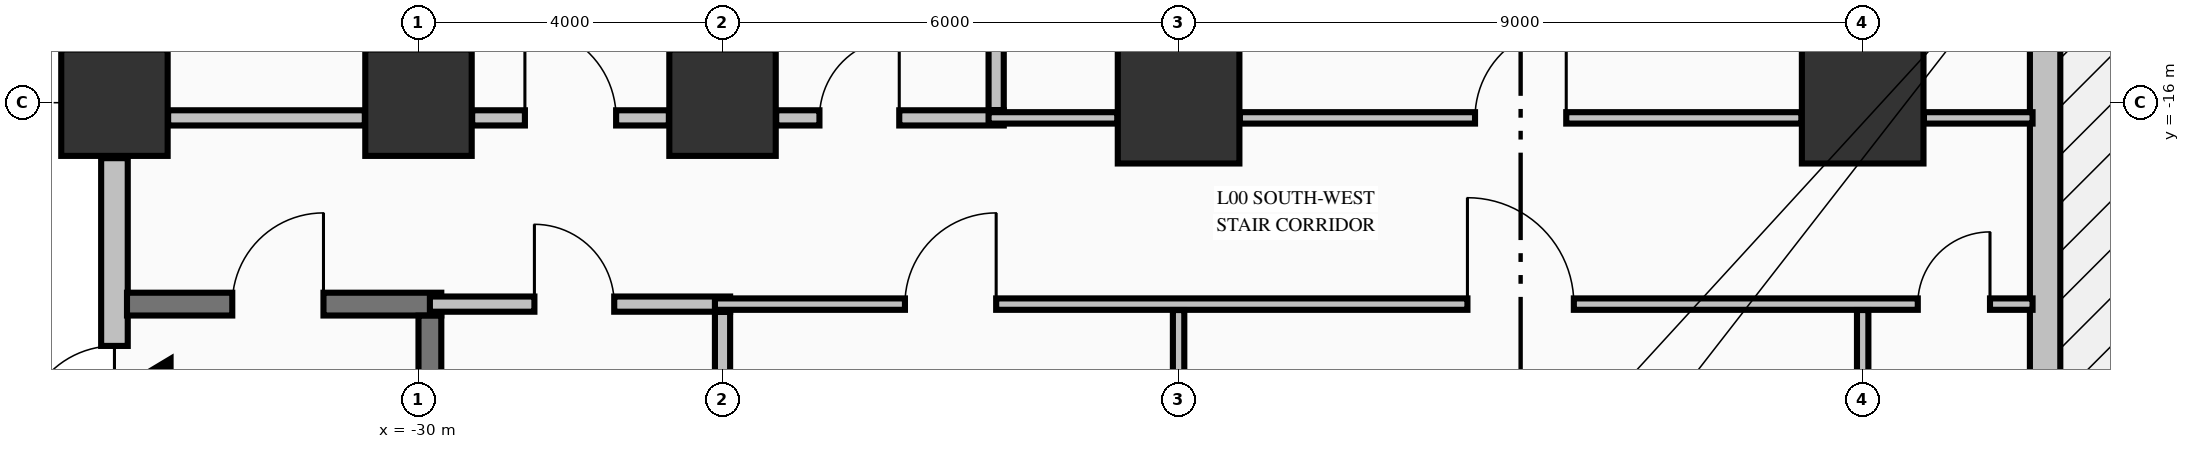
"""IFC4 building model, lengths in metres.
Left out: names, types, materials, properties, quantities, classifications, styles, units other than length and angle.
Written with IfcOpenShell. Run it as: python <this file> out.ifc"""

import sys

from ifc_helpers import new_model, si_unit, direction, frame, frame_2d, origin, origin_2d, place, context, subcontext, project, spatial, rectangle, extrude, element, fill, save


model = new_model("IFC4")
c1 = context("Model", 3, precision=1e-05, world=origin(), true_north=direction((0.0, 1.0)))
c2 = subcontext(c1, "Body", "Model", "MODEL_VIEW")
j1 = project(units=[si_unit("LENGTHUNIT", "METRE"), si_unit("PLANEANGLEUNIT", "RADIAN")], contexts=[c1])
p1 = place(None, origin())
s1 = spatial("IfcSite", under=j1, at=p1, CompositionType="ELEMENT")
p2 = place(p1, origin())
s2 = spatial("IfcBuilding", under=s1, at=p2, CompositionType="ELEMENT")
p3 = place(p2, origin())
s3 = spatial("IfcBuildingStorey", under=s2, at=p3, CompositionType="ELEMENT", Elevation=0.0)
for number, where, z_axis, x_axis in (
    (1, (-34.0, -16.0, 0.0), (0.0, 0.0, 1.0), (1.0, 0.0, 0.0)),
    (2, (-30.0, -16.0, 0.0), (0.0, 0.0, 1.0), (1.0, 0.0, 0.0)),
    (3, (-26.0, -16.0, 0.0), (0.0, 0.0, 1.0), (1.0, 0.0, 0.0)),
):
    element("IfcColumn", number, at=place(p3, frame(where, z_axis=z_axis, x_axis=x_axis)), inside=s3, PredefinedType="COLUMN", context=c2, shape_type="SweptSolid", body=[
        extrude(rectangle(XDim=1.4, YDim=1.4, at=origin_2d()), origin(), (0.0, 0.0, 1.0), 5.09),
    ])
for number, where, z_axis, x_axis in (
    (4, (-20.0, -16.0, 0.0), (0.0, 0.0, 1.0), (1.0, 0.0, 0.0)),
    (5, (-11.0, -16.0, 0.0), (0.0, 0.0, 1.0), (1.0, 0.0, 0.0)),
):
    element("IfcColumn", number, at=place(p3, frame(where, z_axis=z_axis, x_axis=x_axis)), inside=s3, PredefinedType="COLUMN", context=c2, shape_type="SweptSolid", body=[
        extrude(rectangle(XDim=1.6, YDim=1.6, at=origin_2d()), origin(), (0.0, 0.0, 1.0), 5.09),
    ])
p4 = place(p3, frame((-34.0, -21.27, 0.0), z_axis=(0.0, 0.0, 1.0), x_axis=(0.0, 1.0, 0.0)))
e6 = element("IfcWall", 6, at=p4, inside=s3, PredefinedType="STANDARD", context=c2, shape_type="SweptSolid", body=[
    extrude(rectangle(XDim=4.54, YDim=0.35, at=frame_2d((2.27, 0.0))), origin(), (0.0, 0.0, 1.0), 5.09),
])
p5 = place(p4, frame((0.87, 0.0, 0.0)))
e7 = element("IfcOpeningElement", 7, at=p5, cuts=e6, PredefinedType="OPENING", context=c2, shape_type="SweptSolid", body=[
    extrude(rectangle(XDim=1.2, YDim=2.2, at=frame_2d((0.6, 1.1))), frame((0.0, 0.185, 0.0), z_axis=(0.0, -1.0, 0.0), x_axis=(1.0, 0.0, 0.0)), (0.0, 0.0, 1.0), 0.37),
])
p6 = place(p3, frame((-8.6, -25.35, 0.0), z_axis=(0.0, 0.0, 1.0), x_axis=(0.0, 1.0, 0.0)))
e8 = element("IfcWall", 8, at=p6, inside=s3, PredefinedType="STANDARD", context=c2, shape_type="SweptSolid", body=[
    extrude(rectangle(XDim=24.7, YDim=0.4, at=frame_2d((12.35, 0.0))), origin(), (0.0, 0.0, 1.0), 4.132),
])
p7 = place(p6, frame((10.5, 0.0, 0.0)))
e9 = element("IfcOpeningElement", 9, at=p7, cuts=e8, PredefinedType="OPENING", context=c2, shape_type="SweptSolid", body=[
    extrude(rectangle(XDim=2.4, YDim=2.6, at=frame_2d((1.2, 1.3))), frame((0.0, 0.21, 0.0), z_axis=(0.0, -1.0, 0.0), x_axis=(1.0, 0.0, 0.0)), (0.0, 0.0, 1.0), 0.42),
])
p8 = place(p3, frame((-33.835, -18.65, 0.0), z_axis=(0.0, 0.0, 1.0), x_axis=(1.0, 0.0, 0.0)))
e10 = element("IfcWall", 10, at=p8, inside=s3, PredefinedType="SHEAR", context=c2, shape_type="SweptSolid", body=[
    extrude(rectangle(XDim=4.135, YDim=0.3, at=frame_2d((2.067, 0.0))), origin(), (0.0, 0.0, 1.0), 5.09),
])
p9 = place(p8, frame((1.385, 0.0, 0.0)))
e11 = element("IfcOpeningElement", 11, at=p9, cuts=e10, PredefinedType="OPENING", context=c2, shape_type="SweptSolid", body=[
    extrude(rectangle(XDim=1.2, YDim=2.15, at=frame_2d((0.6, 1.075))), frame((0.0, 0.16, 0.0), z_axis=(0.0, -1.0, 0.0), x_axis=(1.0, 0.0, 0.0)), (0.0, 0.0, 1.0), 0.32),
])
p10 = place(p3, frame((-29.85, -18.65, 0.0), z_axis=(0.0, 0.0, 1.0), x_axis=(1.0, 0.0, 0.0)))
e12 = element("IfcWall", 12, at=p10, inside=s3, PredefinedType="PARTITIONING", context=c2, shape_type="SweptSolid", body=[
    extrude(rectangle(XDim=3.95, YDim=0.2, at=frame_2d((1.975, 0.0))), origin(), (0.0, 0.0, 1.0), 5.09),
])
p11 = place(p10, frame((1.375, 0.0, 0.0)))
e13 = element("IfcOpeningElement", 13, at=p11, cuts=e12, PredefinedType="OPENING", context=c2, shape_type="SweptSolid", body=[
    extrude(rectangle(XDim=1.05, YDim=2.15, at=frame_2d((0.525, 1.075))), frame((0.0, 0.11, 0.0), z_axis=(0.0, -1.0, 0.0), x_axis=(1.0, 0.0, 0.0)), (0.0, 0.0, 1.0), 0.22),
])
p12 = place(p3, frame((-26.1, -18.65, 0.0), z_axis=(0.0, 0.0, 1.0), x_axis=(1.0, 0.0, 0.0)))
e14 = element("IfcWall", 14, at=p12, inside=s3, PredefinedType="PARTITIONING", context=c2, shape_type="SweptSolid", body=[
    extrude(rectangle(XDim=17.335, YDim=0.15, at=frame_2d((8.667, 0.0))), origin(), (0.0, 0.0, 1.0), 5.09),
])
p13 = place(p12, frame((2.5, 0.0, 0.0)))
e15 = element("IfcOpeningElement", 15, at=p13, cuts=e14, PredefinedType="OPENING", context=c2, shape_type="SweptSolid", body=[
    extrude(rectangle(XDim=1.2, YDim=2.15, at=frame_2d((0.6, 1.075))), frame((0.0, 0.085, 0.0), z_axis=(0.0, -1.0, 0.0), x_axis=(1.0, 0.0, 0.0)), (0.0, 0.0, 1.0), 0.17),
])
p14 = place(p12, frame((9.9, 0.0, 0.0)))
e16 = element("IfcOpeningElement", 16, at=p14, cuts=e14, PredefinedType="OPENING", context=c2, shape_type="SweptSolid", body=[
    extrude(rectangle(XDim=1.4, YDim=2.2, at=frame_2d((0.7, 1.1))), frame((0.0, 0.085, 0.0), z_axis=(0.0, -1.0, 0.0), x_axis=(1.0, 0.0, 0.0)), (0.0, 0.0, 1.0), 0.17),
])
p15 = place(p12, frame((15.825, 0.0, 0.0)))
e17 = element("IfcOpeningElement", 17, at=p15, cuts=e14, PredefinedType="OPENING", context=c2, shape_type="SweptSolid", body=[
    extrude(rectangle(XDim=0.95, YDim=2.15, at=frame_2d((0.475, 1.075))), frame((0.0, 0.085, 0.0), z_axis=(0.0, -1.0, 0.0), x_axis=(1.0, 0.0, 0.0)), (0.0, 0.0, 1.0), 0.17),
])
p16 = place(p3, frame((-33.294, -16.2, 0.0), z_axis=(0.0, 0.0, 1.0), x_axis=(1.0, 0.0, 0.0)))
e18 = element("IfcWall", 18, at=p16, inside=s3, PredefinedType="PARTITIONING", context=c2, shape_type="SweptSolid", body=[
    extrude(rectangle(XDim=2.588, YDim=0.2, at=frame_2d((1.294, 0.0))), origin(), (0.0, 0.0, 1.0), 4.132),
])
p17 = place(p3, frame((-29.294, -16.2, 0.0), z_axis=(0.0, 0.0, 1.0), x_axis=(1.0, 0.0, 0.0)))
e19 = element("IfcWall", 19, at=p17, inside=s3, PredefinedType="PARTITIONING", context=c2, shape_type="SweptSolid", body=[
    extrude(rectangle(XDim=2.588, YDim=0.2, at=frame_2d((1.294, 0.0))), origin(), (0.0, 0.0, 1.0), 4.132),
])
p18 = place(p17, frame((0.694, 0.0, 0.0)))
e20 = element("IfcOpeningElement", 20, at=p18, cuts=e19, PredefinedType="OPENING", context=c2, shape_type="SweptSolid", body=[
    extrude(rectangle(XDim=1.2, YDim=2.15, at=frame_2d((0.6, 1.075))), frame((0.0, 0.11, 0.0), z_axis=(0.0, -1.0, 0.0), x_axis=(1.0, 0.0, 0.0)), (0.0, 0.0, 1.0), 0.22),
])
p19 = place(p3, frame((-25.294, -16.2, 0.0), z_axis=(0.0, 0.0, 1.0), x_axis=(1.0, 0.0, 0.0)))
e21 = element("IfcWall", 21, at=p19, inside=s3, PredefinedType="PARTITIONING", context=c2, shape_type="SweptSolid", body=[
    extrude(rectangle(XDim=2.994, YDim=0.2, at=frame_2d((1.497, 0.0))), origin(), (0.0, 0.0, 1.0), 4.132),
])
p20 = place(p19, frame((0.569, 0.0, 0.0)))
e22 = element("IfcOpeningElement", 22, at=p20, cuts=e21, PredefinedType="OPENING", context=c2, shape_type="SweptSolid", body=[
    extrude(rectangle(XDim=1.05, YDim=2.15, at=frame_2d((0.525, 1.075))), frame((0.0, 0.11, 0.0), z_axis=(0.0, -1.0, 0.0), x_axis=(1.0, 0.0, 0.0)), (0.0, 0.0, 1.0), 0.22),
])
p21 = place(p3, frame((-22.5, -16.2, 0.0), z_axis=(0.0, 0.0, 1.0), x_axis=(1.0, 0.0, 0.0)))
e23 = element("IfcWall", 23, at=p21, inside=s3, PredefinedType="PARTITIONING", context=c2, shape_type="SweptSolid", body=[
    extrude(rectangle(XDim=1.694, YDim=0.15, at=frame_2d((0.847, 0.0))), origin(), (0.0, 0.0, 1.0), 4.132),
])
p22 = place(p3, frame((-19.194, -16.2, 0.0), z_axis=(0.0, 0.0, 1.0), x_axis=(1.0, 0.0, 0.0)))
e24 = element("IfcWall", 24, at=p22, inside=s3, PredefinedType="PARTITIONING", context=c2, shape_type="SweptSolid", body=[
    extrude(rectangle(XDim=7.388, YDim=0.15, at=frame_2d((3.694, 0.0))), origin(), (0.0, 0.0, 1.0), 4.132),
])
p23 = place(p22, frame((3.094, 0.0, 0.0)))
e25 = element("IfcOpeningElement", 25, at=p23, cuts=e24, PredefinedType="OPENING", context=c2, shape_type="SweptSolid", body=[
    extrude(rectangle(XDim=1.2, YDim=2.15, at=frame_2d((0.6, 1.075))), frame((0.0, 0.085, 0.0), z_axis=(0.0, -1.0, 0.0), x_axis=(1.0, 0.0, 0.0)), (0.0, 0.0, 1.0), 0.17),
])
p24 = place(p3, frame((-10.194, -16.2, 0.0), z_axis=(0.0, 0.0, 1.0), x_axis=(1.0, 0.0, 0.0)))
e26 = element("IfcWall", 26, at=p24, inside=s3, PredefinedType="PARTITIONING", context=c2, shape_type="SweptSolid", body=[
    extrude(rectangle(XDim=1.429, YDim=0.15, at=frame_2d((0.715, 0.0))), origin(), (0.0, 0.0, 1.0), 5.09),
])
p25 = place(p3, frame((-29.85, -28.296, 0.0), z_axis=(0.0, 0.0, 1.0), x_axis=(0.0, 1.0, 0.0)))
e27 = element("IfcWall", 27, at=p25, inside=s3, PredefinedType="SHEAR", context=c2, shape_type="SweptSolid", body=[
    extrude(rectangle(XDim=9.494, YDim=0.3, at=frame_2d((4.747, 0.0))), origin(), (0.0, 0.0, 1.0), 5.09),
])
p26 = place(p3, frame((-26.0, -21.294, 0.0), z_axis=(0.0, 0.0, 1.0), x_axis=(0.0, 1.0, 0.0)))
e28 = element("IfcWall", 28, at=p26, inside=s3, PredefinedType="PARTITIONING", context=c2, shape_type="SweptSolid", body=[
    extrude(rectangle(XDim=2.541, YDim=0.2, at=frame_2d((1.271, 0.0))), origin(), (0.0, 0.0, 1.0), 4.132),
])
p27 = place(p3, frame((-22.4, -16.097, 0.0), z_axis=(0.0, 0.0, 1.0), x_axis=(0.0, 1.0, 0.0)))
e29 = element("IfcWall", 29, at=p27, inside=s3, PredefinedType="PARTITIONING", context=c2, shape_type="SweptSolid", body=[
    extrude(rectangle(XDim=6.044, YDim=0.2, at=frame_2d((3.022, 0.0))), origin(), (0.0, 0.0, 1.0), 5.09),
])
for number, where, z_axis, x_axis in (
    (30, (-20.0, -21.194, 0.0), (0.0, 0.0, 1.0), (0.0, 1.0, 0.0)),
    (31, (-11.0, -21.194, 0.0), (0.0, 0.0, 1.0), (0.0, 1.0, 0.0)),
):
    element("IfcWall", number, at=place(p3, frame(where, z_axis=z_axis, x_axis=x_axis)), inside=s3, PredefinedType="PARTITIONING", context=c2, shape_type="SweptSolid", body=[
        extrude(rectangle(XDim=2.466, YDim=0.15, at=frame_2d((1.233, 0.0))), origin(), (0.0, 0.0, 1.0), 4.132),
    ])
p28 = place(p5, origin())
e32 = element("IfcDoor", 32, at=p28, inside=s3, OperationType="SINGLE_SWING_LEFT", PredefinedType="DOOR", context=c2, shape_type="SweptSolid", body=[
    extrude(rectangle(XDim=1.2, YDim=2.2, at=frame_2d((0.6, 1.1))), frame((0.0, 0.025, 0.0), z_axis=(0.0, -1.0, 0.0), x_axis=(1.0, 0.0, 0.0)), (0.0, 0.0, 1.0), 0.05),
])
fill(e7, e32)
p29 = place(p9, origin())
e33 = element("IfcDoor", 33, at=p29, inside=s3, OperationType="SINGLE_SWING_RIGHT", PredefinedType="DOOR", context=c2, shape_type="SweptSolid", body=[
    extrude(rectangle(XDim=1.2, YDim=2.15, at=frame_2d((0.6, 1.075))), frame((0.0, 0.025, 0.0), z_axis=(0.0, -1.0, 0.0), x_axis=(1.0, 0.0, 0.0)), (0.0, 0.0, 1.0), 0.05),
])
fill(e11, e33)
p30 = place(p23, origin())
e34 = element("IfcDoor", 34, at=p30, inside=s3, OperationType="SINGLE_SWING_RIGHT", PredefinedType="DOOR", context=c2, shape_type="SweptSolid", body=[
    extrude(rectangle(XDim=1.2, YDim=2.15, at=frame_2d((0.6, 1.075))), frame((0.0, 0.025, 0.0), z_axis=(0.0, -1.0, 0.0), x_axis=(1.0, 0.0, 0.0)), (0.0, 0.0, 1.0), 0.05),
])
fill(e25, e34)
p31 = place(p11, origin())
e35 = element("IfcDoor", 35, at=p31, inside=s3, OperationType="SINGLE_SWING_LEFT", PredefinedType="DOOR", context=c2, shape_type="SweptSolid", body=[
    extrude(rectangle(XDim=1.05, YDim=2.15, at=frame_2d((0.525, 1.075))), frame((0.0, 0.025, 0.0), z_axis=(0.0, -1.0, 0.0), x_axis=(1.0, 0.0, 0.0)), (0.0, 0.0, 1.0), 0.05),
])
fill(e13, e35)
p32 = place(p13, origin())
e36 = element("IfcDoor", 36, at=p32, inside=s3, OperationType="SINGLE_SWING_RIGHT", PredefinedType="DOOR", context=c2, shape_type="SweptSolid", body=[
    extrude(rectangle(XDim=1.2, YDim=2.15, at=frame_2d((0.6, 1.075))), frame((0.0, 0.025, 0.0), z_axis=(0.0, -1.0, 0.0), x_axis=(1.0, 0.0, 0.0)), (0.0, 0.0, 1.0), 0.05),
])
fill(e15, e36)
p33 = place(p14, origin())
e37 = element("IfcDoor", 37, at=p33, inside=s3, OperationType="SINGLE_SWING_LEFT", PredefinedType="DOOR", context=c2, shape_type="SweptSolid", body=[
    extrude(rectangle(XDim=1.4, YDim=2.2, at=frame_2d((0.7, 1.1))), frame((0.0, 0.025, 0.0), z_axis=(0.0, -1.0, 0.0), x_axis=(1.0, 0.0, 0.0)), (0.0, 0.0, 1.0), 0.05),
])
fill(e16, e37)
p34 = place(p15, origin())
e38 = element("IfcDoor", 38, at=p34, inside=s3, OperationType="SINGLE_SWING_RIGHT", PredefinedType="DOOR", context=c2, shape_type="SweptSolid", body=[
    extrude(rectangle(XDim=0.95, YDim=2.15, at=frame_2d((0.475, 1.075))), frame((0.0, 0.025, 0.0), z_axis=(0.0, -1.0, 0.0), x_axis=(1.0, 0.0, 0.0)), (0.0, 0.0, 1.0), 0.05),
])
fill(e17, e38)
p35 = place(p18, origin())
e39 = element("IfcDoor", 39, at=p35, inside=s3, OperationType="SINGLE_SWING_LEFT", PredefinedType="DOOR", context=c2, shape_type="SweptSolid", body=[
    extrude(rectangle(XDim=1.2, YDim=2.15, at=frame_2d((0.6, 1.075))), frame((0.0, 0.025, 0.0), z_axis=(0.0, -1.0, 0.0), x_axis=(1.0, 0.0, 0.0)), (0.0, 0.0, 1.0), 0.05),
])
fill(e20, e39)
p36 = place(p20, origin())
e40 = element("IfcDoor", 40, at=p36, inside=s3, OperationType="SINGLE_SWING_RIGHT", PredefinedType="DOOR", context=c2, shape_type="SweptSolid", body=[
    extrude(rectangle(XDim=1.05, YDim=2.15, at=frame_2d((0.525, 1.075))), frame((0.0, 0.025, 0.0), z_axis=(0.0, -1.0, 0.0), x_axis=(1.0, 0.0, 0.0)), (0.0, 0.0, 1.0), 0.05),
])
fill(e22, e40)
save(model, sys.argv[1])
